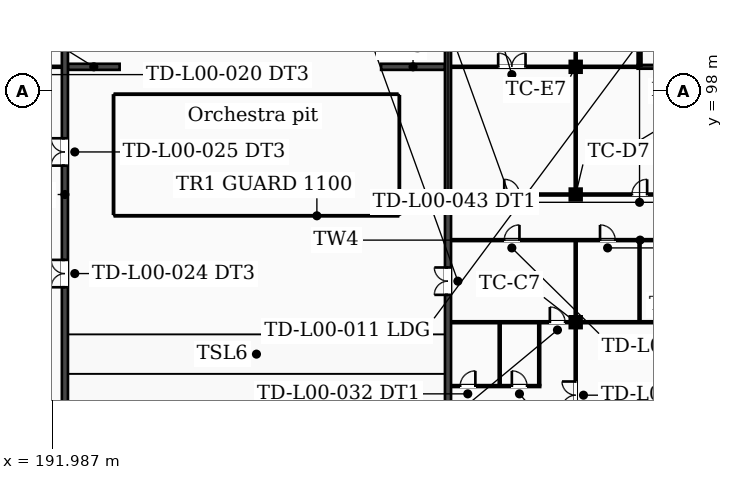
"""IFC4 building model, lengths in metres.
Left out: names, types, materials, properties, quantities, classifications, styles, units other than length and angle.
Written with IfcOpenShell. Run it as: python <this file> out.ifc"""

import sys

from ifc_helpers import new_model, si_unit, direction, frame, frame_2d, origin, origin_2d, place, context, subcontext, project, spatial, rectangle, extrude, element, fill, save


model = new_model("IFC4")
c1 = context("Model", 3, precision=1e-05, world=origin(), true_north=direction((0.0, 1.0)))
c2 = subcontext(c1, "Body", "Model", "MODEL_VIEW")
j1 = project(units=[si_unit("LENGTHUNIT", "METRE"), si_unit("PLANEANGLEUNIT", "RADIAN")], contexts=[c1])
p1 = place(None, origin())
s1 = spatial("IfcSite", under=j1, at=p1, CompositionType="ELEMENT")
p2 = place(p1, origin())
s2 = spatial("IfcBuilding", under=s1, at=p2, CompositionType="ELEMENT")
p3 = place(p2, origin())
s3 = spatial("IfcBuildingStorey", under=s2, at=p3, CompositionType="ELEMENT", Elevation=0.0)
p4 = place(p3, frame((218.2, 78.6, 0.0), z_axis=(0.0, 0.0, 1.0), x_axis=(1.0, 0.0, 0.0)))
e1 = element("IfcWall", 1, at=p4, inside=s3, PredefinedType="PARTITIONING", context=c2, shape_type="SweptSolid", body=[
    extrude(rectangle(XDim=5.863, YDim=0.125, at=frame_2d((2.931, 0.0))), origin(), (0.0, 0.0, 1.0), 8.7),
])
p5 = place(p4, frame((0.6, 0.0, 0.0)))
e2 = element("IfcOpeningElement", 2, at=p5, cuts=e1, PredefinedType="OPENING", context=c2, shape_type="SweptSolid", body=[
    extrude(rectangle(XDim=1.0, YDim=2.1, at=frame_2d((0.5, 1.05))), frame((0.0, 0.073, 0.0), z_axis=(0.0, -1.0, 0.0), x_axis=(1.0, 0.0, 0.0)), (0.0, 0.0, 1.0), 0.145),
])
p6 = place(p4, frame((4.0, 0.0, 0.0)))
e3 = element("IfcOpeningElement", 3, at=p6, cuts=e1, PredefinedType="OPENING", context=c2, shape_type="SweptSolid", body=[
    extrude(rectangle(XDim=1.0, YDim=2.1, at=frame_2d((0.5, 1.05))), frame((0.0, 0.073, 0.0), z_axis=(0.0, -1.0, 0.0), x_axis=(1.0, 0.0, 0.0)), (0.0, 0.0, 1.0), 0.145),
])
p7 = place(p3, frame((218.2, 82.8, 0.0), z_axis=(0.0, 0.0, 1.0), x_axis=(1.0, 0.0, 0.0)))
e4 = element("IfcWall", 4, at=p7, inside=s3, PredefinedType="PARTITIONING", context=c2, shape_type="SweptSolid", body=[
    extrude(rectangle(XDim=7.9, YDim=0.125, at=frame_2d((3.95, 0.0))), origin(), (0.0, 0.0, 1.0), 8.7),
])
p8 = place(p7, frame((6.5, 0.0, 0.0)))
e5 = element("IfcOpeningElement", 5, at=p8, cuts=e4, PredefinedType="OPENING", context=c2, shape_type="SweptSolid", body=[
    extrude(rectangle(XDim=1.0, YDim=2.1, at=frame_2d((0.5, 1.05))), frame((0.0, 0.073, 0.0), z_axis=(0.0, -1.0, 0.0), x_axis=(1.0, 0.0, 0.0)), (0.0, 0.0, 1.0), 0.145),
])
p9 = place(p3, frame((226.7, 82.8, 0.0), z_axis=(0.0, 0.0, 1.0), x_axis=(1.0, 0.0, 0.0)))
e6 = element("IfcWall", 6, at=p9, inside=s3, PredefinedType="PARTITIONING", context=c2, shape_type="SweptSolid", body=[
    extrude(rectangle(XDim=15.9, YDim=0.125, at=frame_2d((7.95, 0.0))), origin(), (0.0, 0.0, 1.0), 7.5),
])
p10 = place(p3, frame((218.2, 88.2, 0.0), z_axis=(0.0, 0.0, 1.0), x_axis=(1.0, 0.0, 0.0)))
e7 = element("IfcWall", 7, at=p10, inside=s3, PredefinedType="PARTITIONING", context=c2, shape_type="SweptSolid", body=[
    extrude(rectangle(XDim=24.875, YDim=0.125, at=frame_2d((12.438, 0.0))), origin(), (0.0, 0.0, 1.0), 8.7),
])
p11 = place(p10, frame((3.5, 0.0, 0.0)))
e8 = element("IfcOpeningElement", 8, at=p11, cuts=e7, PredefinedType="OPENING", context=c2, shape_type="SweptSolid", body=[
    extrude(rectangle(XDim=1.0, YDim=2.1, at=frame_2d((0.5, 1.05))), frame((0.0, 0.073, 0.0), z_axis=(0.0, -1.0, 0.0), x_axis=(1.0, 0.0, 0.0)), (0.0, 0.0, 1.0), 0.145),
])
p12 = place(p10, frame((9.8, 0.0, 0.0)))
e9 = element("IfcOpeningElement", 9, at=p12, cuts=e7, PredefinedType="OPENING", context=c2, shape_type="SweptSolid", body=[
    extrude(rectangle(XDim=1.0, YDim=2.1, at=frame_2d((0.5, 1.05))), frame((0.0, 0.073, 0.0), z_axis=(0.0, -1.0, 0.0), x_axis=(1.0, 0.0, 0.0)), (0.0, 0.0, 1.0), 0.145),
])
p13 = place(p10, frame((14.0, 0.0, 0.0)))
e10 = element("IfcOpeningElement", 10, at=p13, cuts=e7, PredefinedType="OPENING", context=c2, shape_type="SweptSolid", body=[
    extrude(rectangle(XDim=1.0, YDim=2.1, at=frame_2d((0.5, 1.05))), frame((0.0, 0.073, 0.0), z_axis=(0.0, -1.0, 0.0), x_axis=(1.0, 0.0, 0.0)), (0.0, 0.0, 1.0), 0.145),
])
p14 = place(p10, frame((18.2, 0.0, 0.0)))
e11 = element("IfcOpeningElement", 11, at=p14, cuts=e7, PredefinedType="OPENING", context=c2, shape_type="SweptSolid", body=[
    extrude(rectangle(XDim=1.0, YDim=2.1, at=frame_2d((0.5, 1.05))), frame((0.0, 0.073, 0.0), z_axis=(0.0, -1.0, 0.0), x_axis=(1.0, 0.0, 0.0)), (0.0, 0.0, 1.0), 0.145),
])
p15 = place(p10, frame((22.4, 0.0, 0.0)))
e12 = element("IfcOpeningElement", 12, at=p15, cuts=e7, PredefinedType="OPENING", context=c2, shape_type="SweptSolid", body=[
    extrude(rectangle(XDim=1.0, YDim=2.1, at=frame_2d((0.5, 1.05))), frame((0.0, 0.073, 0.0), z_axis=(0.0, -1.0, 0.0), x_axis=(1.0, 0.0, 0.0)), (0.0, 0.0, 1.0), 0.145),
])
p16 = place(p3, frame((218.2, 91.2, 0.0), z_axis=(0.0, 0.0, 1.0), x_axis=(1.0, 0.0, 0.0)))
e13 = element("IfcWall", 13, at=p16, inside=s3, PredefinedType="PARTITIONING", context=c2, shape_type="SweptSolid", body=[
    extrude(rectangle(XDim=7.9, YDim=0.125, at=frame_2d((3.95, 0.0))), origin(), (0.0, 0.0, 1.0), 8.7),
])
p17 = place(p16, frame((3.5, 0.0, 0.0)))
e14 = element("IfcOpeningElement", 14, at=p17, cuts=e13, PredefinedType="OPENING", context=c2, shape_type="SweptSolid", body=[
    extrude(rectangle(XDim=1.0, YDim=2.1, at=frame_2d((0.5, 1.05))), frame((0.0, 0.073, 0.0), z_axis=(0.0, -1.0, 0.0), x_axis=(1.0, 0.0, 0.0)), (0.0, 0.0, 1.0), 0.145),
])
p18 = place(p3, frame((226.7, 91.2, 0.0), z_axis=(0.0, 0.0, 1.0), x_axis=(1.0, 0.0, 0.0)))
e15 = element("IfcWall", 15, at=p18, inside=s3, PredefinedType="PARTITIONING", context=c2, shape_type="SweptSolid", body=[
    extrude(rectangle(XDim=7.8, YDim=0.125, at=frame_2d((3.9, 0.0))), origin(), (0.0, 0.0, 1.0), 8.7),
])
p19 = place(p18, frame((3.4, 0.0, 0.0)))
e16 = element("IfcOpeningElement", 16, at=p19, cuts=e15, PredefinedType="OPENING", context=c2, shape_type="SweptSolid", body=[
    extrude(rectangle(XDim=1.0, YDim=2.1, at=frame_2d((0.5, 1.05))), frame((0.0, 0.073, 0.0), z_axis=(0.0, -1.0, 0.0), x_axis=(1.0, 0.0, 0.0)), (0.0, 0.0, 1.0), 0.145),
])
p20 = place(p3, frame((184.7, 99.6, 0.0), z_axis=(0.0, 0.0, 1.0), x_axis=(1.0, 0.0, 0.0)))
e17 = element("IfcWall", 17, at=p20, inside=s3, PredefinedType="PARTITIONING", context=c2, shape_type="SweptSolid", body=[
    extrude(rectangle(XDim=7.9, YDim=0.125, at=frame_2d((3.95, 0.0))), origin(), (0.0, 0.0, 1.0), 8.7),
])
p21 = place(p20, frame((1.9, 0.0, 0.0)))
e18 = element("IfcOpeningElement", 18, at=p21, cuts=e17, PredefinedType="OPENING", context=c2, shape_type="SweptSolid", body=[
    extrude(rectangle(XDim=1.8, YDim=2.1, at=frame_2d((0.9, 1.05))), frame((0.0, 0.073, 0.0), z_axis=(0.0, -1.0, 0.0), x_axis=(1.0, 0.0, 0.0)), (0.0, 0.0, 1.0), 0.145),
])
p22 = place(p3, frame((193.0, 99.6, 0.0), z_axis=(0.0, 0.0, 1.0), x_axis=(1.0, 0.0, 0.0)))
e19 = element("IfcWall", 19, at=p22, inside=s3, PredefinedType="SOLIDWALL", context=c2, shape_type="SweptSolid", body=[
    extrude(rectangle(XDim=3.4, YDim=0.4, at=frame_2d((1.7, 0.0))), origin(), (0.0, 0.0, 1.0), 8.7),
])
p23 = place(p3, frame((213.6, 99.6, 0.0), z_axis=(0.0, 0.0, 1.0), x_axis=(1.0, 0.0, 0.0)))
e20 = element("IfcWall", 20, at=p23, inside=s3, PredefinedType="SOLIDWALL", context=c2, shape_type="SweptSolid", body=[
    extrude(rectangle(XDim=4.2, YDim=0.4, at=frame_2d((2.1, 0.0))), origin(), (0.0, 0.0, 1.0), 8.7),
])
p24 = place(p3, frame((218.2, 99.6, 0.0), z_axis=(0.0, 0.0, 1.0), x_axis=(1.0, 0.0, 0.0)))
e21 = element("IfcWall", 21, at=p24, inside=s3, PredefinedType="PARTITIONING", context=c2, shape_type="SweptSolid", body=[
    extrude(rectangle(XDim=7.9, YDim=0.125, at=frame_2d((3.95, 0.0))), origin(), (0.0, 0.0, 1.0), 8.7),
])
p25 = place(p24, frame((3.1, 0.0, 0.0)))
e22 = element("IfcOpeningElement", 22, at=p25, cuts=e21, PredefinedType="OPENING", context=c2, shape_type="SweptSolid", body=[
    extrude(rectangle(XDim=1.8, YDim=2.1, at=frame_2d((0.9, 1.05))), frame((0.0, 0.073, 0.0), z_axis=(0.0, -1.0, 0.0), x_axis=(1.0, 0.0, 0.0)), (0.0, 0.0, 1.0), 0.145),
])
p26 = place(p3, frame((226.7, 99.6, 0.0), z_axis=(0.0, 0.0, 1.0), x_axis=(1.0, 0.0, 0.0)))
e23 = element("IfcWall", 23, at=p26, inside=s3, PredefinedType="PARTITIONING", context=c2, shape_type="SweptSolid", body=[
    extrude(rectangle(XDim=4.025, YDim=0.125, at=frame_2d((2.013, 0.0))), origin(), (0.0, 0.0, 1.0), 8.7),
])
p27 = place(p3, frame((230.475, 99.6, 0.0), z_axis=(0.0, 0.0, 1.0), x_axis=(1.0, 0.0, 0.0)))
e24 = element("IfcWall", 24, at=p27, inside=s3, PredefinedType="SOLIDWALL", context=c2, shape_type="SweptSolid", body=[
    extrude(rectangle(XDim=4.387, YDim=0.25, at=frame_2d((2.194, 0.0))), origin(), (0.0, 0.0, 1.0), 8.7),
])
p28 = place(p3, frame((192.8, 66.125, 0.0), z_axis=(0.0, 0.0, 1.0), x_axis=(0.0, 1.0, 0.0)))
e25 = element("IfcWall", 25, at=p28, inside=s3, PredefinedType="SOLIDWALL", context=c2, shape_type="SweptSolid", body=[
    extrude(rectangle(XDim=50.15, YDim=0.4, at=frame_2d((25.075, 0.0))), origin(), (0.0, 0.0, 1.0), 8.7),
])
p29 = place(p28, frame((18.975, 0.0, 0.0)))
e26 = element("IfcOpeningElement", 26, at=p29, cuts=e25, PredefinedType="OPENING", context=c2, shape_type="SweptSolid", body=[
    extrude(rectangle(XDim=1.8, YDim=2.1, at=frame_2d((0.9, 1.05))), frame((0.0, 0.21, 0.0), z_axis=(0.0, -1.0, 0.0), x_axis=(1.0, 0.0, 0.0)), (0.0, 0.0, 1.0), 0.42),
])
p30 = place(p28, frame((26.975, 0.0, 0.0)))
e27 = element("IfcOpeningElement", 27, at=p30, cuts=e25, PredefinedType="OPENING", context=c2, shape_type="SweptSolid", body=[
    extrude(rectangle(XDim=1.8, YDim=2.1, at=frame_2d((0.9, 1.05))), frame((0.0, 0.21, 0.0), z_axis=(0.0, -1.0, 0.0), x_axis=(1.0, 0.0, 0.0)), (0.0, 0.0, 1.0), 0.42),
])
p31 = place(p28, frame((35.975, 0.0, 0.0)))
e28 = element("IfcOpeningElement", 28, at=p31, cuts=e25, PredefinedType="OPENING", context=c2, shape_type="SweptSolid", body=[
    extrude(rectangle(XDim=1.8, YDim=2.1, at=frame_2d((0.9, 1.05))), frame((0.0, 0.21, 0.0), z_axis=(0.0, -1.0, 0.0), x_axis=(1.0, 0.0, 0.0)), (0.0, 0.0, 1.0), 0.42),
])
p32 = place(p3, frame((218.0, 66.4, 0.0), z_axis=(0.0, 0.0, 1.0), x_axis=(0.0, 1.0, 0.0)))
e29 = element("IfcWall", 29, at=p32, inside=s3, PredefinedType="SOLIDWALL", context=c2, shape_type="SweptSolid", body=[
    extrude(rectangle(XDim=49.6, YDim=0.4, at=frame_2d((24.8, 0.0))), origin(), (0.0, 0.0, 1.0), 8.7),
])
p33 = place(p32, frame((18.2, 0.0, 0.0)))
e30 = element("IfcOpeningElement", 30, at=p33, cuts=e29, PredefinedType="OPENING", context=c2, shape_type="SweptSolid", body=[
    extrude(rectangle(XDim=1.8, YDim=2.1, at=frame_2d((0.9, 1.05))), frame((0.0, 0.21, 0.0), z_axis=(0.0, -1.0, 0.0), x_axis=(1.0, 0.0, 0.0)), (0.0, 0.0, 1.0), 0.42),
])
p34 = place(p32, frame((35.7, 0.0, 0.0)))
e31 = element("IfcOpeningElement", 31, at=p34, cuts=e29, PredefinedType="OPENING", context=c2, shape_type="SweptSolid", body=[
    extrude(rectangle(XDim=1.8, YDim=2.1, at=frame_2d((0.9, 1.05))), frame((0.0, 0.21, 0.0), z_axis=(0.0, -1.0, 0.0), x_axis=(1.0, 0.0, 0.0)), (0.0, 0.0, 1.0), 0.42),
])
p35 = place(p32, frame((44.7, 0.0, 0.0)))
e32 = element("IfcOpeningElement", 32, at=p35, cuts=e29, PredefinedType="OPENING", context=c2, shape_type="SweptSolid", body=[
    extrude(rectangle(XDim=1.8, YDim=2.1, at=frame_2d((0.9, 1.05))), frame((0.0, 0.21, 0.0), z_axis=(0.0, -1.0, 0.0), x_axis=(1.0, 0.0, 0.0)), (0.0, 0.0, 1.0), 0.42),
])
for number, where, z_axis, x_axis in (
    (33, (221.4, 78.663, 0.0), (0.0, 0.0, 1.0), (0.0, 1.0, 0.0)),
    (34, (224.0, 78.663, 0.0), (0.0, 0.0, 1.0), (0.0, 1.0, 0.0)),
):
    element("IfcWall", number, at=place(p3, frame(where, z_axis=z_axis, x_axis=x_axis)), inside=s3, PredefinedType="PARTITIONING", context=c2, shape_type="SweptSolid", body=[
        extrude(rectangle(XDim=4.075, YDim=0.125, at=frame_2d((2.038, 0.0))), origin(), (0.0, 0.0, 1.0), 8.7),
    ])
p36 = place(p3, frame((226.4, 74.7, 0.0), z_axis=(0.0, 0.0, 1.0), x_axis=(0.0, 1.0, 0.0)))
e35 = element("IfcWall", 35, at=p36, inside=s3, PredefinedType="PARTITIONING", context=c2, shape_type="SweptSolid", body=[
    extrude(rectangle(XDim=7.8, YDim=0.125, at=frame_2d((3.9, 0.0))), origin(), (0.0, 0.0, 1.0), 8.7),
])
p37 = place(p36, frame((2.4, 0.0, 0.0)))
e36 = element("IfcOpeningElement", 36, at=p37, cuts=e35, PredefinedType="OPENING", context=c2, shape_type="SweptSolid", body=[
    extrude(rectangle(XDim=1.8, YDim=2.1, at=frame_2d((0.9, 1.05))), frame((0.0, 0.073, 0.0), z_axis=(0.0, -1.0, 0.0), x_axis=(1.0, 0.0, 0.0)), (0.0, 0.0, 1.0), 0.145),
])
p38 = place(p3, frame((226.4, 83.1, 0.0), z_axis=(0.0, 0.0, 1.0), x_axis=(0.0, 1.0, 0.0)))
e37 = element("IfcWall", 37, at=p38, inside=s3, PredefinedType="PARTITIONING", context=c2, shape_type="SweptSolid", body=[
    extrude(rectangle(XDim=5.037, YDim=0.125, at=frame_2d((2.519, 0.0))), origin(), (0.0, 0.0, 1.0), 8.7),
])
for number, where, z_axis, x_axis in (
    (38, (226.4, 91.5, 0.0), (0.0, 0.0, 1.0), (0.0, 1.0, 0.0)),
    (39, (226.4, 99.9, 0.0), (0.0, 0.0, 1.0), (0.0, 1.0, 0.0)),
):
    element("IfcWall", number, at=place(p3, frame(where, z_axis=z_axis, x_axis=x_axis)), inside=s3, PredefinedType="PARTITIONING", context=c2, shape_type="SweptSolid", body=[
        extrude(rectangle(XDim=7.8, YDim=0.125, at=frame_2d((3.9, 0.0))), origin(), (0.0, 0.0, 1.0), 8.7),
    ])
p39 = place(p3, frame((230.6, 82.863, 0.0), z_axis=(0.0, 0.0, 1.0), x_axis=(0.0, 1.0, 0.0)))
e40 = element("IfcWall", 40, at=p39, inside=s3, PredefinedType="PARTITIONING", context=c2, shape_type="SweptSolid", body=[
    extrude(rectangle(XDim=5.275, YDim=0.125, at=frame_2d((2.637, 0.0))), origin(), (0.0, 0.0, 1.0), 8.7),
])
p40 = place(p3, frame((230.6, 99.663, 0.0), z_axis=(0.0, 0.0, 1.0), x_axis=(0.0, 1.0, 0.0)))
e41 = element("IfcWall", 41, at=p40, inside=s3, PredefinedType="SOLIDWALL", context=c2, shape_type="SweptSolid", body=[
    extrude(rectangle(XDim=4.612, YDim=0.25, at=frame_2d((2.306, 0.0))), origin(), (0.0, 0.0, 1.0), 8.7),
])
p41 = place(p40, frame((1.637, 0.0, 0.0)))
e42 = element("IfcOpeningElement", 42, at=p41, cuts=e41, PredefinedType="OPENING", context=c2, shape_type="SweptSolid", body=[
    extrude(rectangle(XDim=1.4, YDim=2.1, at=frame_2d((0.7, 1.05))), frame((0.0, 0.135, 0.0), z_axis=(0.0, -1.0, 0.0), x_axis=(1.0, 0.0, 0.0)), (0.0, 0.0, 1.0), 0.27),
])
for number, where, z_axis, x_axis in (
    (43, (226.4, 82.8, 0.0), (0.0, 0.0, 1.0), (1.0, 0.0, 0.0)),
    (44, (226.4, 91.2, 0.0), (0.0, 0.0, 1.0), (1.0, 0.0, 0.0)),
    (45, (226.4, 99.6, 0.0), (0.0, 0.0, 1.0), (1.0, 0.0, 0.0)),
):
    element("IfcColumn", number, at=place(p3, frame(where, z_axis=z_axis, x_axis=x_axis)), inside=s3, PredefinedType="COLUMN", context=c2, shape_type="SweptSolid", body=[
        extrude(rectangle(XDim=0.6, YDim=0.6, at=origin_2d()), origin(), (0.0, 0.0, 1.0), 8.7),
    ])
for number, where, z_axis, x_axis in (
    (46, (195.7, 89.65, -2.5), (0.0, 0.0, 1.0), (1.0, 0.0, 0.0)),
    (47, (195.7, 97.95, -2.5), (0.0, 0.0, 1.0), (1.0, 0.0, 0.0)),
):
    element("IfcWall", number, at=place(p3, frame(where, z_axis=z_axis, x_axis=x_axis)), inside=s3, PredefinedType="SOLIDWALL", context=c2, shape_type="SweptSolid", body=[
        extrude(rectangle(XDim=19.4, YDim=0.3, at=frame_2d((9.7, 0.0))), origin(), (0.0, 0.0, 1.0), 2.2),
    ])
for number, where, z_axis, x_axis in (
    (48, (195.85, 89.8, -2.5), (0.0, 0.0, 1.0), (0.0, 1.0, 0.0)),
    (49, (214.95, 89.8, -2.5), (0.0, 0.0, 1.0), (0.0, 1.0, 0.0)),
):
    element("IfcWall", number, at=place(p3, frame(where, z_axis=z_axis, x_axis=x_axis)), inside=s3, PredefinedType="SOLIDWALL", context=c2, shape_type="SweptSolid", body=[
        extrude(rectangle(XDim=8.0, YDim=0.3, at=frame_2d((4.0, 0.0))), origin(), (0.0, 0.0, 1.0), 2.2),
    ])
p42 = place(p3, frame((230.475, 99.6, -1.4), z_axis=(0.0, 0.0, 1.0), x_axis=(1.0, 0.0, 0.0)))
e50 = element("IfcWall", 50, at=p42, inside=s3, PredefinedType="SOLIDWALL", context=c2, shape_type="SweptSolid", body=[
    extrude(rectangle(XDim=4.45, YDim=0.25, at=frame_2d((2.225, 0.0))), origin(), (0.0, 0.0, 1.0), 1.1),
])
p43 = place(p3, frame((230.6, 99.725, -1.4), z_axis=(0.0, 0.0, 1.0), x_axis=(0.0, 1.0, 0.0)))
e51 = element("IfcWall", 51, at=p43, inside=s3, PredefinedType="SOLIDWALL", context=c2, shape_type="SweptSolid", body=[
    extrude(rectangle(XDim=4.55, YDim=0.25, at=frame_2d((2.275, 0.0))), origin(), (0.0, 0.0, 1.0), 1.1),
])
p44 = place(p29, origin())
e52 = element("IfcDoor", 52, at=p44, inside=s3, OperationType="DOUBLE_DOOR_SINGLE_SWING", PredefinedType="DOOR", context=c2, shape_type="SweptSolid", body=[
    extrude(rectangle(XDim=1.8, YDim=2.1, at=frame_2d((0.9, 1.05))), frame((0.0, 0.025, 0.0), z_axis=(0.0, -1.0, 0.0), x_axis=(1.0, 0.0, 0.0)), (0.0, 0.0, 1.0), 0.05),
])
fill(e26, e52)
p45 = place(p30, origin())
e53 = element("IfcDoor", 53, at=p45, inside=s3, OperationType="DOUBLE_DOOR_SINGLE_SWING", PredefinedType="DOOR", context=c2, shape_type="SweptSolid", body=[
    extrude(rectangle(XDim=1.8, YDim=2.1, at=frame_2d((0.9, 1.05))), frame((0.0, 0.025, 0.0), z_axis=(0.0, -1.0, 0.0), x_axis=(1.0, 0.0, 0.0)), (0.0, 0.0, 1.0), 0.05),
])
fill(e27, e53)
p46 = place(p37, origin())
e54 = element("IfcDoor", 54, at=p46, inside=s3, OperationType="DOUBLE_DOOR_SINGLE_SWING", PredefinedType="DOOR", context=c2, shape_type="SweptSolid", body=[
    extrude(rectangle(XDim=1.8, YDim=2.1, at=frame_2d((0.9, 1.05))), frame((0.0, 0.025, 0.0), z_axis=(0.0, -1.0, 0.0), x_axis=(1.0, 0.0, 0.0)), (0.0, 0.0, 1.0), 0.05),
])
fill(e36, e54)
p47 = place(p5, origin())
e55 = element("IfcDoor", 55, at=p47, inside=s3, OperationType="SINGLE_SWING_RIGHT", PredefinedType="DOOR", context=c2, shape_type="SweptSolid", body=[
    extrude(rectangle(XDim=1.0, YDim=2.1, at=frame_2d((0.5, 1.05))), frame((0.0, 0.025, 0.0), z_axis=(0.0, -1.0, 0.0), x_axis=(1.0, 0.0, 0.0)), (0.0, 0.0, 1.0), 0.05),
])
fill(e2, e55)
p48 = place(p6, origin())
e56 = element("IfcDoor", 56, at=p48, inside=s3, OperationType="SINGLE_SWING_LEFT", PredefinedType="DOOR", context=c2, shape_type="SweptSolid", body=[
    extrude(rectangle(XDim=1.0, YDim=2.1, at=frame_2d((0.5, 1.05))), frame((0.0, 0.025, 0.0), z_axis=(0.0, -1.0, 0.0), x_axis=(1.0, 0.0, 0.0)), (0.0, 0.0, 1.0), 0.05),
])
fill(e3, e56)
p49 = place(p33, origin())
e57 = element("IfcDoor", 57, at=p49, inside=s3, OperationType="DOUBLE_DOOR_SINGLE_SWING", PredefinedType="DOOR", context=c2, shape_type="SweptSolid", body=[
    extrude(rectangle(XDim=1.8, YDim=2.1, at=frame_2d((0.9, 1.05))), frame((0.0, 0.025, 0.0), z_axis=(0.0, -1.0, 0.0), x_axis=(1.0, 0.0, 0.0)), (0.0, 0.0, 1.0), 0.05),
])
fill(e30, e57)
p50 = place(p8, origin())
e58 = element("IfcDoor", 58, at=p50, inside=s3, OperationType="SINGLE_SWING_LEFT", PredefinedType="DOOR", context=c2, shape_type="SweptSolid", body=[
    extrude(rectangle(XDim=1.0, YDim=2.1, at=frame_2d((0.5, 1.05))), frame((0.0, 0.025, 0.0), z_axis=(0.0, -1.0, 0.0), x_axis=(1.0, 0.0, 0.0)), (0.0, 0.0, 1.0), 0.05),
])
fill(e5, e58)
p51 = place(p11, origin())
e59 = element("IfcDoor", 59, at=p51, inside=s3, OperationType="SINGLE_SWING_RIGHT", PredefinedType="DOOR", context=c2, shape_type="SweptSolid", body=[
    extrude(rectangle(XDim=1.0, YDim=2.1, at=frame_2d((0.5, 1.05))), frame((0.0, 0.025, 0.0), z_axis=(0.0, -1.0, 0.0), x_axis=(1.0, 0.0, 0.0)), (0.0, 0.0, 1.0), 0.05),
])
fill(e8, e59)
p52 = place(p12, origin())
e60 = element("IfcDoor", 60, at=p52, inside=s3, OperationType="SINGLE_SWING_LEFT", PredefinedType="DOOR", context=c2, shape_type="SweptSolid", body=[
    extrude(rectangle(XDim=1.0, YDim=2.1, at=frame_2d((0.5, 1.05))), frame((0.0, 0.025, 0.0), z_axis=(0.0, -1.0, 0.0), x_axis=(1.0, 0.0, 0.0)), (0.0, 0.0, 1.0), 0.05),
])
fill(e9, e60)
p53 = place(p17, origin())
e61 = element("IfcDoor", 61, at=p53, inside=s3, OperationType="SINGLE_SWING_LEFT", PredefinedType="DOOR", context=c2, shape_type="SweptSolid", body=[
    extrude(rectangle(XDim=1.0, YDim=2.1, at=frame_2d((0.5, 1.05))), frame((0.0, 0.025, 0.0), z_axis=(0.0, -1.0, 0.0), x_axis=(1.0, 0.0, 0.0)), (0.0, 0.0, 1.0), 0.05),
])
fill(e14, e61)
p54 = place(p19, origin())
e62 = element("IfcDoor", 62, at=p54, inside=s3, OperationType="SINGLE_SWING_RIGHT", PredefinedType="DOOR", context=c2, shape_type="SweptSolid", body=[
    extrude(rectangle(XDim=1.0, YDim=2.1, at=frame_2d((0.5, 1.05))), frame((0.0, 0.025, 0.0), z_axis=(0.0, -1.0, 0.0), x_axis=(1.0, 0.0, 0.0)), (0.0, 0.0, 1.0), 0.05),
])
fill(e16, e62)
p55 = place(p25, origin())
e63 = element("IfcDoor", 63, at=p55, inside=s3, OperationType="DOUBLE_DOOR_SINGLE_SWING", PredefinedType="DOOR", context=c2, shape_type="SweptSolid", body=[
    extrude(rectangle(XDim=1.8, YDim=2.1, at=frame_2d((0.9, 1.05))), frame((0.0, 0.025, 0.0), z_axis=(0.0, -1.0, 0.0), x_axis=(1.0, 0.0, 0.0)), (0.0, 0.0, 1.0), 0.05),
])
fill(e22, e63)
save(model, sys.argv[1])
